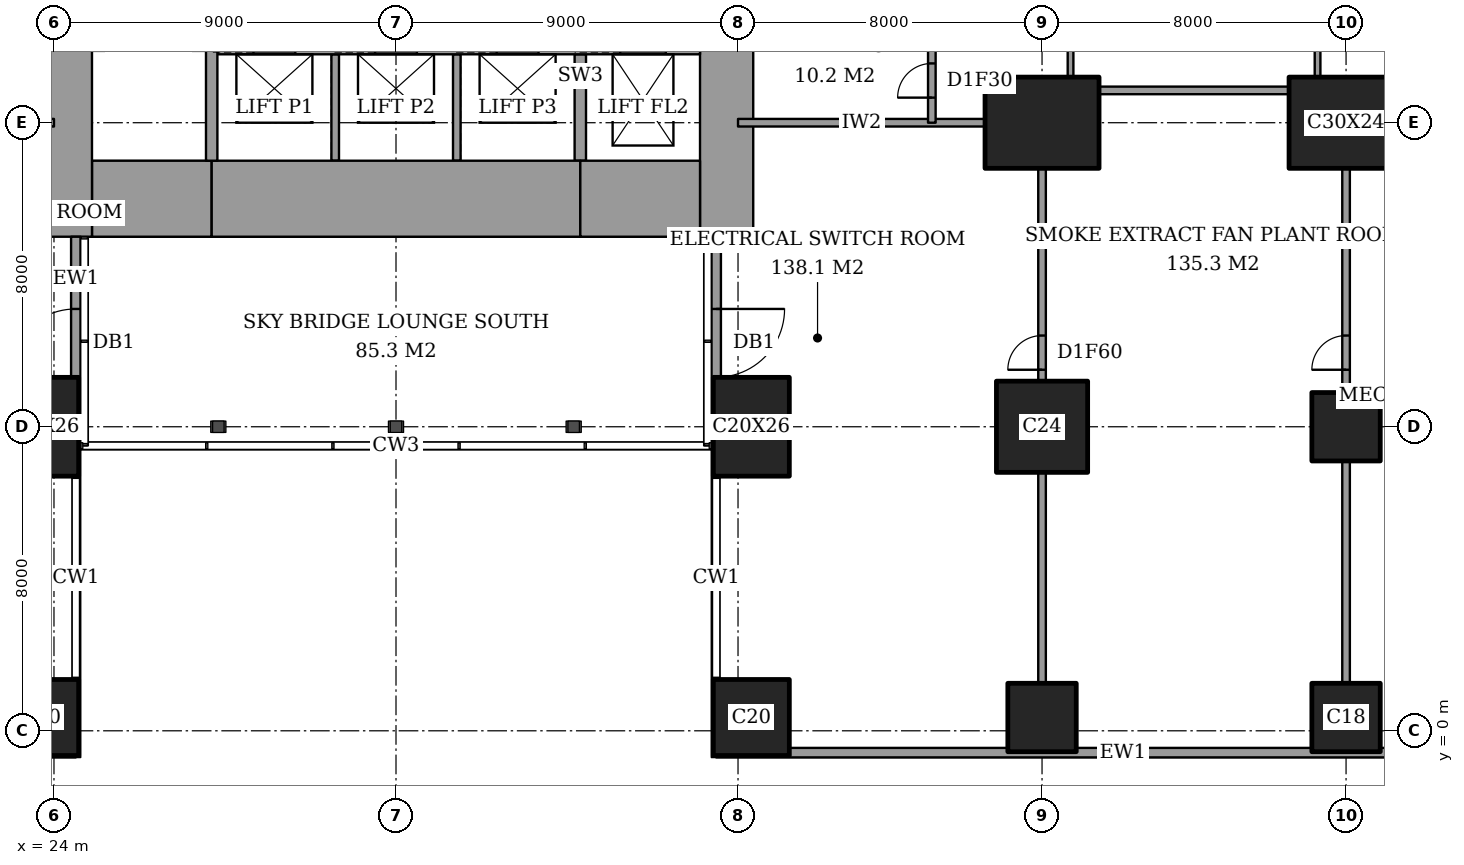
"""IFC4 building model, lengths in metres.
Left out: names, types, materials, properties, quantities, classifications, styles, units other than length and angle.
Written with IfcOpenShell. Run it as: python <this file> out.ifc"""

import sys

from ifc_helpers import new_model, si_unit, direction, frame, frame_2d, origin, origin_2d, place, context, subcontext, project, spatial, rectangle, extrude, element, fill, save


model = new_model("IFC4")
c1 = context("Model", 3, precision=1e-05, world=origin(), true_north=direction((0.0, 1.0)))
c2 = subcontext(c1, "Body", "Model", "MODEL_VIEW")
j1 = project(units=[si_unit("LENGTHUNIT", "METRE"), si_unit("PLANEANGLEUNIT", "RADIAN")], contexts=[c1])
p1 = place(None, origin())
s1 = spatial("IfcSite", under=j1, at=p1, CompositionType="ELEMENT")
p2 = place(p1, origin())
s2 = spatial("IfcBuilding", under=s1, at=p2, CompositionType="ELEMENT")
p3 = place(p2, frame((0.0, 0.0, 177.2)))
s3 = spatial("IfcBuildingStorey", under=s2, at=p3, CompositionType="ELEMENT", Elevation=177.2)
p4 = place(p3, frame((23.65, 0.35, 0.0), z_axis=(0.0, 0.0, 1.0), x_axis=(1.0, 0.0, 0.0)))
e1 = element("IfcColumn", 1, at=p4, inside=s3, PredefinedType="COLUMN", context=c2, shape_type="SweptSolid", body=[
    extrude(rectangle(XDim=2.0, YDim=2.0, at=origin_2d()), origin(), (0.0, 0.0, 1.0), 5.0),
])
p5 = place(p3, frame((23.65, 8.0, 0.0), z_axis=(0.0, 0.0, 1.0), x_axis=(1.0, 0.0, 0.0)))
e2 = element("IfcColumn", 2, at=p5, inside=s3, PredefinedType="COLUMN", context=c2, shape_type="SweptSolid", body=[
    extrude(rectangle(XDim=2.0, YDim=2.6, at=origin_2d()), origin(), (0.0, 0.0, 1.0), 5.0),
])
p6 = place(p3, frame((42.35, 0.35, 0.0), z_axis=(0.0, 0.0, 1.0), x_axis=(1.0, 0.0, 0.0)))
e3 = element("IfcColumn", 3, at=p6, inside=s3, PredefinedType="COLUMN", context=c2, shape_type="SweptSolid", body=[
    extrude(rectangle(XDim=2.0, YDim=2.0, at=origin_2d()), origin(), (0.0, 0.0, 1.0), 5.0),
])
p7 = place(p3, frame((42.35, 8.0, 0.0), z_axis=(0.0, 0.0, 1.0), x_axis=(1.0, 0.0, 0.0)))
e4 = element("IfcColumn", 4, at=p7, inside=s3, PredefinedType="COLUMN", context=c2, shape_type="SweptSolid", body=[
    extrude(rectangle(XDim=2.0, YDim=2.6, at=origin_2d()), origin(), (0.0, 0.0, 1.0), 5.0),
])
p8 = place(p3, frame((50.0, 0.35, 0.0), z_axis=(0.0, 0.0, 1.0), x_axis=(1.0, 0.0, 0.0)))
e5 = element("IfcColumn", 5, at=p8, inside=s3, PredefinedType="COLUMN", context=c2, shape_type="SweptSolid", body=[
    extrude(rectangle(XDim=1.8, YDim=1.8, at=origin_2d()), origin(), (0.0, 0.0, 1.0), 5.0),
])
p9 = place(p3, frame((50.0, 8.0, 0.0), z_axis=(0.0, 0.0, 1.0), x_axis=(1.0, 0.0, 0.0)))
e6 = element("IfcColumn", 6, at=p9, inside=s3, PredefinedType="COLUMN", context=c2, shape_type="SweptSolid", body=[
    extrude(rectangle(XDim=2.4, YDim=2.4, at=origin_2d()), origin(), (0.0, 0.0, 1.0), 5.0),
])
p10 = place(p3, frame((50.0, 16.0, 0.0), z_axis=(0.0, 0.0, 1.0), x_axis=(1.0, 0.0, 0.0)))
e7 = element("IfcColumn", 7, at=p10, inside=s3, PredefinedType="COLUMN", context=c2, shape_type="SweptSolid", body=[
    extrude(rectangle(XDim=3.0, YDim=2.4, at=origin_2d()), origin(), (0.0, 0.0, 1.0), 5.0),
])
for number, where, z_axis, x_axis in (
    (8, (58.0, 0.35, 0.0), (0.0, 0.0, 1.0), (1.0, 0.0, 0.0)),
    (9, (58.0, 8.0, 0.0), (0.0, 0.0, 1.0), (1.0, 0.0, 0.0)),
):
    element("IfcColumn", number, at=place(p3, frame(where, z_axis=z_axis, x_axis=x_axis)), inside=s3, PredefinedType="COLUMN", context=c2, shape_type="SweptSolid", body=[
        extrude(rectangle(XDim=1.8, YDim=1.8, at=origin_2d()), origin(), (0.0, 0.0, 1.0), 5.0),
    ])
p11 = place(p3, frame((58.0, 16.0, 0.0), z_axis=(0.0, 0.0, 1.0), x_axis=(1.0, 0.0, 0.0)))
e10 = element("IfcColumn", 10, at=p11, inside=s3, PredefinedType="COLUMN", context=c2, shape_type="SweptSolid", body=[
    extrude(rectangle(XDim=3.0, YDim=2.4, at=origin_2d()), origin(), (0.0, 0.0, 1.0), 5.0),
])
p12 = place(p3, frame((25.0, 14.0, 0.0), z_axis=(0.0, 0.0, 1.0), x_axis=(1.0, 0.0, 0.0)))
e11 = element("IfcWall", 11, at=p12, inside=s3, PredefinedType="SHEAR", context=c2, shape_type="SweptSolid", body=[
    extrude(rectangle(XDim=3.15, YDim=2.0, at=frame_2d((1.575, 0.0))), origin(), (0.0, 0.0, 1.0), 5.0),
])
p13 = place(p3, frame((28.15, 14.0, 0.0), z_axis=(0.0, 0.0, 1.0), x_axis=(1.0, 0.0, 0.0)))
e12 = element("IfcWall", 12, at=p13, inside=s3, PredefinedType="SHEAR", context=c2, shape_type="SweptSolid", body=[
    extrude(rectangle(XDim=9.7, YDim=2.0, at=frame_2d((4.85, 0.0))), origin(), (0.0, 0.0, 1.0), 5.0),
])
p14 = place(p3, frame((37.85, 14.0, 0.0), z_axis=(0.0, 0.0, 1.0), x_axis=(1.0, 0.0, 0.0)))
e13 = element("IfcWall", 13, at=p14, inside=s3, PredefinedType="SHEAR", context=c2, shape_type="SweptSolid", body=[
    extrude(rectangle(XDim=3.15, YDim=2.0, at=frame_2d((1.575, 0.0))), origin(), (0.0, 0.0, 1.0), 5.0),
])
p15 = place(p3, frame((24.3, 13.0, 0.0), z_axis=(0.0, 0.0, 1.0), x_axis=(0.0, 1.0, 0.0)))
e14 = element("IfcWall", 14, at=p15, inside=s3, PredefinedType="SHEAR", context=c2, shape_type="SweptSolid", body=[
    extrude(rectangle(XDim=10.15, YDim=1.4, at=frame_2d((5.075, 0.0))), origin(), (0.0, 0.0, 1.0), 5.0),
])
p16 = place(p3, frame((41.7, 13.0, 0.0), z_axis=(0.0, 0.0, 1.0), x_axis=(0.0, 1.0, 0.0)))
e15 = element("IfcWall", 15, at=p16, inside=s3, PredefinedType="SHEAR", context=c2, shape_type="SweptSolid", body=[
    extrude(rectangle(XDim=11.85, YDim=1.4, at=frame_2d((5.925, 0.0))), origin(), (0.0, 0.0, 1.0), 5.0),
])
p17 = place(p16, frame((7.5, 0.0, 0.0)))
e16 = element("IfcOpeningElement", 16, at=p17, cuts=e15, PredefinedType="OPENING", context=c2, shape_type="SweptSolid", body=[
    extrude(rectangle(XDim=1.8, YDim=2.4, at=frame_2d((0.9, 1.2))), frame((0.0, 0.71, 0.0), z_axis=(0.0, -1.0, 0.0), x_axis=(1.0, 0.0, 0.0)), (0.0, 0.0, 1.0), 1.42),
])
p18 = place(p3, frame((28.15, 15.0, 0.0), z_axis=(0.0, 0.0, 1.0), x_axis=(0.0, 1.0, 0.0)))
e17 = element("IfcWall", 17, at=p18, inside=s3, PredefinedType="SHEAR", context=c2, shape_type="SweptSolid", body=[
    extrude(rectangle(XDim=8.15, YDim=0.3, at=frame_2d((4.075, 0.0))), origin(), (0.0, 0.0, 1.0), 5.0),
])
p19 = place(p3, frame((24.575, 7.4, 0.0), z_axis=(0.0, 0.0, 1.0), x_axis=(0.0, 1.0, 0.0)))
e18 = element("IfcWall", 18, at=p19, inside=s3, PredefinedType="SOLIDWALL", context=c2, shape_type="SweptSolid", body=[
    extrude(rectangle(XDim=5.6, YDim=0.25, at=frame_2d((2.8, 0.0))), origin(), (0.0, 0.0, 1.0), 5.0),
])
p20 = place(p19, frame((1.9, 0.0, 0.0)))
e19 = element("IfcOpeningElement", 19, at=p20, cuts=e18, PredefinedType="OPENING", context=c2, shape_type="SweptSolid", body=[
    extrude(rectangle(XDim=1.8, YDim=2.4, at=frame_2d((0.9, 1.2))), frame((0.0, 0.135, 0.0), z_axis=(0.0, -1.0, 0.0), x_axis=(1.0, 0.0, 0.0)), (0.0, 0.0, 1.0), 0.27),
])
p21 = place(p3, frame((41.425, 13.0, 0.0), z_axis=(0.0, 0.0, 1.0), x_axis=(0.0, -1.0, 0.0)))
e20 = element("IfcWall", 20, at=p21, inside=s3, PredefinedType="SOLIDWALL", context=c2, shape_type="SweptSolid", body=[
    extrude(rectangle(XDim=5.6, YDim=0.25, at=frame_2d((2.8, 0.0))), origin(), (0.0, 0.0, 1.0), 5.0),
])
p22 = place(p21, frame((1.9, 0.0, 0.0)))
e21 = element("IfcOpeningElement", 21, at=p22, cuts=e20, PredefinedType="OPENING", context=c2, shape_type="SweptSolid", body=[
    extrude(rectangle(XDim=1.8, YDim=2.4, at=frame_2d((0.9, 1.2))), frame((0.0, 0.135, 0.0), z_axis=(0.0, -1.0, 0.0), x_axis=(1.0, 0.0, 0.0)), (0.0, 0.0, 1.0), 0.27),
])
p23 = place(p3, frame((41.425, -0.575, 0.0), z_axis=(0.0, 0.0, 1.0), x_axis=(1.0, 0.0, 0.0)))
e22 = element("IfcWall", 22, at=p23, inside=s3, PredefinedType="SOLIDWALL", context=c2, shape_type="SweptSolid", body=[
    extrude(rectangle(XDim=21.4, YDim=0.25, at=frame_2d((10.7, 0.0))), origin(), (0.0, 0.0, 1.0), 5.0),
])
p24 = place(p23, frame((18.175, 0.0, 0.6)))
e23 = element("IfcOpeningElement", 23, at=p24, cuts=e22, PredefinedType="OPENING", context=c2, shape_type="SweptSolid", body=[
    extrude(rectangle(XDim=2.4, YDim=3.0, at=frame_2d((1.2, 1.5))), frame((0.0, 0.135, 0.0), z_axis=(0.0, -1.0, 0.0), x_axis=(1.0, 0.0, 0.0)), (0.0, 0.0, 1.0), 0.27),
])
p25 = place(p3, frame((3.175, -0.575, 0.0), z_axis=(0.0, 0.0, 1.0), x_axis=(1.0, 0.0, 0.0)))
e24 = element("IfcWall", 24, at=p25, inside=s3, PredefinedType="SOLIDWALL", context=c2, shape_type="SweptSolid", body=[
    extrude(rectangle(XDim=21.4, YDim=0.25, at=frame_2d((10.7, 0.0))), origin(), (0.0, 0.0, 1.0), 5.0),
])
p26 = place(p25, frame((0.825, 0.0, 0.6)))
e25 = element("IfcOpeningElement", 25, at=p26, cuts=e24, PredefinedType="OPENING", context=c2, shape_type="SweptSolid", body=[
    extrude(rectangle(XDim=2.4, YDim=3.0, at=frame_2d((1.2, 1.5))), frame((0.0, 0.135, 0.0), z_axis=(0.0, -1.0, 0.0), x_axis=(1.0, 0.0, 0.0)), (0.0, 0.0, 1.0), 0.27),
])
for number, where, z_axis, x_axis in (
    (26, (17.5, 16.0, 0.0), (0.0, 0.0, 1.0), (1.0, 0.0, 0.0)),
    (27, (42.0, 16.0, 0.0), (0.0, 0.0, 1.0), (1.0, 0.0, 0.0)),
):
    element("IfcWall", number, at=place(p3, frame(where, z_axis=z_axis, x_axis=x_axis)), inside=s3, PredefinedType="PARTITIONING", context=c2, shape_type="SweptSolid", body=[
        extrude(rectangle(XDim=6.5, YDim=0.2, at=frame_2d((3.25, 0.0))), origin(), (0.0, 0.0, 1.0), 4.75),
    ])
p27 = place(p3, frame((51.5, 16.85, 0.0), z_axis=(0.0, 0.0, 1.0), x_axis=(1.0, 0.0, 0.0)))
e28 = element("IfcWall", 28, at=p27, inside=s3, PredefinedType="PARTITIONING", context=c2, shape_type="SweptSolid", body=[
    extrude(rectangle(XDim=5.0, YDim=0.2, at=frame_2d((2.5, 0.0))), origin(), (0.0, 0.0, 1.0), 4.75),
])
p28 = place(p3, frame((47.1, 16.0, 0.0), z_axis=(0.0, 0.0, 1.0), x_axis=(0.0, 1.0, 0.0)))
e29 = element("IfcWall", 29, at=p28, inside=s3, PredefinedType="PARTITIONING", context=c2, shape_type="SweptSolid", body=[
    extrude(rectangle(XDim=4.0, YDim=0.2, at=frame_2d((2.0, 0.0))), origin(), (0.0, 0.0, 1.0), 4.75),
])
p29 = place(p28, frame((0.66, 0.0, 0.0)))
e30 = element("IfcOpeningElement", 30, at=p29, cuts=e29, PredefinedType="OPENING", context=c2, shape_type="SweptSolid", body=[
    extrude(rectangle(XDim=0.9, YDim=2.1, at=frame_2d((0.45, 1.05))), frame((0.0, 0.11, 0.0), z_axis=(0.0, -1.0, 0.0), x_axis=(1.0, 0.0, 0.0)), (0.0, 0.0, 1.0), 0.22),
])
p30 = place(p28, frame((2.54, 0.0, 0.0)))
e31 = element("IfcOpeningElement", 31, at=p30, cuts=e29, PredefinedType="OPENING", context=c2, shape_type="SweptSolid", body=[
    extrude(rectangle(XDim=0.9, YDim=2.1, at=frame_2d((0.45, 1.05))), frame((0.0, 0.11, 0.0), z_axis=(0.0, -1.0, 0.0), x_axis=(1.0, 0.0, 0.0)), (0.0, 0.0, 1.0), 0.22),
])
p31 = place(p3, frame((50.0, 1.25, 0.0), z_axis=(0.0, 0.0, 1.0), x_axis=(0.0, 1.0, 0.0)))
e32 = element("IfcWall", 32, at=p31, inside=s3, PredefinedType="PARTITIONING", context=c2, shape_type="SweptSolid", body=[
    extrude(rectangle(XDim=5.55, YDim=0.2, at=frame_2d((2.775, 0.0))), origin(), (0.0, 0.0, 1.0), 4.75),
])
p32 = place(p3, frame((50.0, 9.2, 0.0), z_axis=(0.0, 0.0, 1.0), x_axis=(0.0, 1.0, 0.0)))
e33 = element("IfcWall", 33, at=p32, inside=s3, PredefinedType="PARTITIONING", context=c2, shape_type="SweptSolid", body=[
    extrude(rectangle(XDim=5.6, YDim=0.2, at=frame_2d((2.8, 0.0))), origin(), (0.0, 0.0, 1.0), 4.75),
])
p33 = place(p32, frame((0.3, 0.0, 0.0)))
e34 = element("IfcOpeningElement", 34, at=p33, cuts=e33, PredefinedType="OPENING", context=c2, shape_type="SweptSolid", body=[
    extrude(rectangle(XDim=0.9, YDim=2.1, at=frame_2d((0.45, 1.05))), frame((0.0, 0.11, 0.0), z_axis=(0.0, -1.0, 0.0), x_axis=(1.0, 0.0, 0.0)), (0.0, 0.0, 1.0), 0.22),
])
p34 = place(p3, frame((50.75, 17.2, 0.0), z_axis=(0.0, 0.0, 1.0), x_axis=(0.0, 1.0, 0.0)))
e35 = element("IfcWall", 35, at=p34, inside=s3, PredefinedType="PARTITIONING", context=c2, shape_type="SweptSolid", body=[
    extrude(rectangle(XDim=5.9, YDim=0.15, at=frame_2d((2.95, 0.0))), origin(), (0.0, 0.0, 1.0), 4.75),
])
p35 = place(p3, frame((57.25, 17.2, 0.0), z_axis=(0.0, 0.0, 1.0), x_axis=(0.0, 1.0, 0.0)))
e36 = element("IfcWall", 36, at=p35, inside=s3, PredefinedType="PARTITIONING", context=c2, shape_type="SweptSolid", body=[
    extrude(rectangle(XDim=5.9, YDim=0.15, at=frame_2d((2.95, 0.0))), origin(), (0.0, 0.0, 1.0), 4.75),
])
p36 = place(p35, frame((4.14, 0.0, 0.0)))
e37 = element("IfcOpeningElement", 37, at=p36, cuts=e36, PredefinedType="OPENING", context=c2, shape_type="SweptSolid", body=[
    extrude(rectangle(XDim=1.0, YDim=2.1, at=frame_2d((0.5, 1.05))), frame((0.0, 0.085, 0.0), z_axis=(0.0, -1.0, 0.0), x_axis=(1.0, 0.0, 0.0)), (0.0, 0.0, 1.0), 0.17),
])
p37 = place(p3, frame((58.0, 1.25, 0.0), z_axis=(0.0, 0.0, 1.0), x_axis=(0.0, 1.0, 0.0)))
e38 = element("IfcWall", 38, at=p37, inside=s3, PredefinedType="PARTITIONING", context=c2, shape_type="SweptSolid", body=[
    extrude(rectangle(XDim=5.85, YDim=0.2, at=frame_2d((2.925, 0.0))), origin(), (0.0, 0.0, 1.0), 4.75),
])
p38 = place(p3, frame((58.0, 8.9, 0.0), z_axis=(0.0, 0.0, 1.0), x_axis=(0.0, 1.0, 0.0)))
e39 = element("IfcWall", 39, at=p38, inside=s3, PredefinedType="PARTITIONING", context=c2, shape_type="SweptSolid", body=[
    extrude(rectangle(XDim=5.9, YDim=0.2, at=frame_2d((2.95, 0.0))), origin(), (0.0, 0.0, 1.0), 4.75),
])
p39 = place(p38, frame((0.6, 0.0, 0.0)))
e40 = element("IfcOpeningElement", 40, at=p39, cuts=e39, PredefinedType="OPENING", context=c2, shape_type="SweptSolid", body=[
    extrude(rectangle(XDim=0.9, YDim=2.1, at=frame_2d((0.45, 1.05))), frame((0.0, 0.11, 0.0), z_axis=(0.0, -1.0, 0.0), x_axis=(1.0, 0.0, 0.0)), (0.0, 0.0, 1.0), 0.22),
])
p40 = place(p3, frame((28.3, 17.9, 0.0), z_axis=(0.0, 0.0, 1.0), x_axis=(1.0, 0.0, 0.0)))
e41 = element("IfcWall", 41, at=p40, inside=s3, PredefinedType="PARTITIONING", context=c2, shape_type="SweptSolid", body=[
    extrude(rectangle(XDim=12.7, YDim=0.2, at=frame_2d((6.35, 0.0))), origin(), (0.0, 0.0, 1.0), 5.0),
])
p41 = place(p40, frame((0.95, 0.0, 0.0)))
e42 = element("IfcOpeningElement", 42, at=p41, cuts=e41, PredefinedType="OPENING", context=c2, shape_type="SweptSolid", body=[
    extrude(rectangle(XDim=1.1, YDim=2.1, at=frame_2d((0.55, 1.05))), frame((0.0, 0.11, 0.0), z_axis=(0.0, -1.0, 0.0), x_axis=(1.0, 0.0, 0.0)), (0.0, 0.0, 1.0), 0.22),
])
p42 = place(p40, frame((4.15, 0.0, 0.0)))
e43 = element("IfcOpeningElement", 43, at=p42, cuts=e41, PredefinedType="OPENING", context=c2, shape_type="SweptSolid", body=[
    extrude(rectangle(XDim=1.1, YDim=2.1, at=frame_2d((0.55, 1.05))), frame((0.0, 0.11, 0.0), z_axis=(0.0, -1.0, 0.0), x_axis=(1.0, 0.0, 0.0)), (0.0, 0.0, 1.0), 0.22),
])
p43 = place(p40, frame((7.35, 0.0, 0.0)))
e44 = element("IfcOpeningElement", 44, at=p43, cuts=e41, PredefinedType="OPENING", context=c2, shape_type="SweptSolid", body=[
    extrude(rectangle(XDim=1.1, YDim=2.1, at=frame_2d((0.55, 1.05))), frame((0.0, 0.11, 0.0), z_axis=(0.0, -1.0, 0.0), x_axis=(1.0, 0.0, 0.0)), (0.0, 0.0, 1.0), 0.22),
])
p44 = place(p40, frame((10.6, 0.0, 0.0)))
e45 = element("IfcOpeningElement", 45, at=p44, cuts=e41, PredefinedType="OPENING", context=c2, shape_type="SweptSolid", body=[
    extrude(rectangle(XDim=1.2, YDim=2.1, at=frame_2d((0.6, 1.05))), frame((0.0, 0.11, 0.0), z_axis=(0.0, -1.0, 0.0), x_axis=(1.0, 0.0, 0.0)), (0.0, 0.0, 1.0), 0.22),
])
for number, where, z_axis, x_axis in (
    (46, (31.4, 15.0, 0.0), (0.0, 0.0, 1.0), (0.0, 1.0, 0.0)),
    (47, (34.6, 15.0, 0.0), (0.0, 0.0, 1.0), (0.0, 1.0, 0.0)),
):
    element("IfcWall", number, at=place(p3, frame(where, z_axis=z_axis, x_axis=x_axis)), inside=s3, PredefinedType="PARTITIONING", context=c2, shape_type="SweptSolid", body=[
        extrude(rectangle(XDim=2.8, YDim=0.2, at=frame_2d((1.4, 0.0))), origin(), (0.0, 0.0, 1.0), 5.0),
    ])
p45 = place(p3, frame((37.85, 15.0, 0.0), z_axis=(0.0, 0.0, 1.0), x_axis=(0.0, 1.0, 0.0)))
e48 = element("IfcWall", 48, at=p45, inside=s3, PredefinedType="SHEAR", context=c2, shape_type="SweptSolid", body=[
    extrude(rectangle(XDim=2.8, YDim=0.3, at=frame_2d((1.4, 0.0))), origin(), (0.0, 0.0, 1.0), 5.0),
])
p46 = place(p20, origin())
e49 = element("IfcDoor", 49, at=p46, inside=s3, OperationType="DOUBLE_DOOR_DOUBLE_SWING", PredefinedType="DOOR", context=c2, shape_type="SweptSolid", body=[
    extrude(rectangle(XDim=1.8, YDim=2.4, at=frame_2d((0.9, 1.2))), frame((0.0, 0.025, 0.0), z_axis=(0.0, -1.0, 0.0), x_axis=(1.0, 0.0, 0.0)), (0.0, 0.0, 1.0), 0.05),
])
fill(e19, e49)
p47 = place(p22, origin())
e50 = element("IfcDoor", 50, at=p47, inside=s3, OperationType="DOUBLE_DOOR_DOUBLE_SWING", PredefinedType="DOOR", context=c2, shape_type="SweptSolid", body=[
    extrude(rectangle(XDim=1.8, YDim=2.4, at=frame_2d((0.9, 1.2))), frame((0.0, 0.025, 0.0), z_axis=(0.0, -1.0, 0.0), x_axis=(1.0, 0.0, 0.0)), (0.0, 0.0, 1.0), 0.05),
])
fill(e21, e50)
p48 = place(p29, origin())
e51 = element("IfcDoor", 51, at=p48, inside=s3, OperationType="SINGLE_SWING_RIGHT", PredefinedType="DOOR", context=c2, shape_type="SweptSolid", body=[
    extrude(rectangle(XDim=0.9, YDim=2.1, at=frame_2d((0.45, 1.05))), frame((0.0, 0.025, 0.0), z_axis=(0.0, -1.0, 0.0), x_axis=(1.0, 0.0, 0.0)), (0.0, 0.0, 1.0), 0.05),
])
fill(e30, e51)
p49 = place(p39, origin())
e52 = element("IfcDoor", 52, at=p49, inside=s3, OperationType="SINGLE_SWING_RIGHT", PredefinedType="DOOR", context=c2, shape_type="SweptSolid", body=[
    extrude(rectangle(XDim=0.9, YDim=2.1, at=frame_2d((0.45, 1.05))), frame((0.0, 0.025, 0.0), z_axis=(0.0, -1.0, 0.0), x_axis=(1.0, 0.0, 0.0)), (0.0, 0.0, 1.0), 0.05),
])
fill(e40, e52)
p50 = place(p33, origin())
e53 = element("IfcDoor", 53, at=p50, inside=s3, OperationType="SINGLE_SWING_RIGHT", PredefinedType="DOOR", context=c2, shape_type="SweptSolid", body=[
    extrude(rectangle(XDim=0.9, YDim=2.1, at=frame_2d((0.45, 1.05))), frame((0.0, 0.025, 0.0), z_axis=(0.0, -1.0, 0.0), x_axis=(1.0, 0.0, 0.0)), (0.0, 0.0, 1.0), 0.05),
])
fill(e34, e53)
save(model, sys.argv[1])
